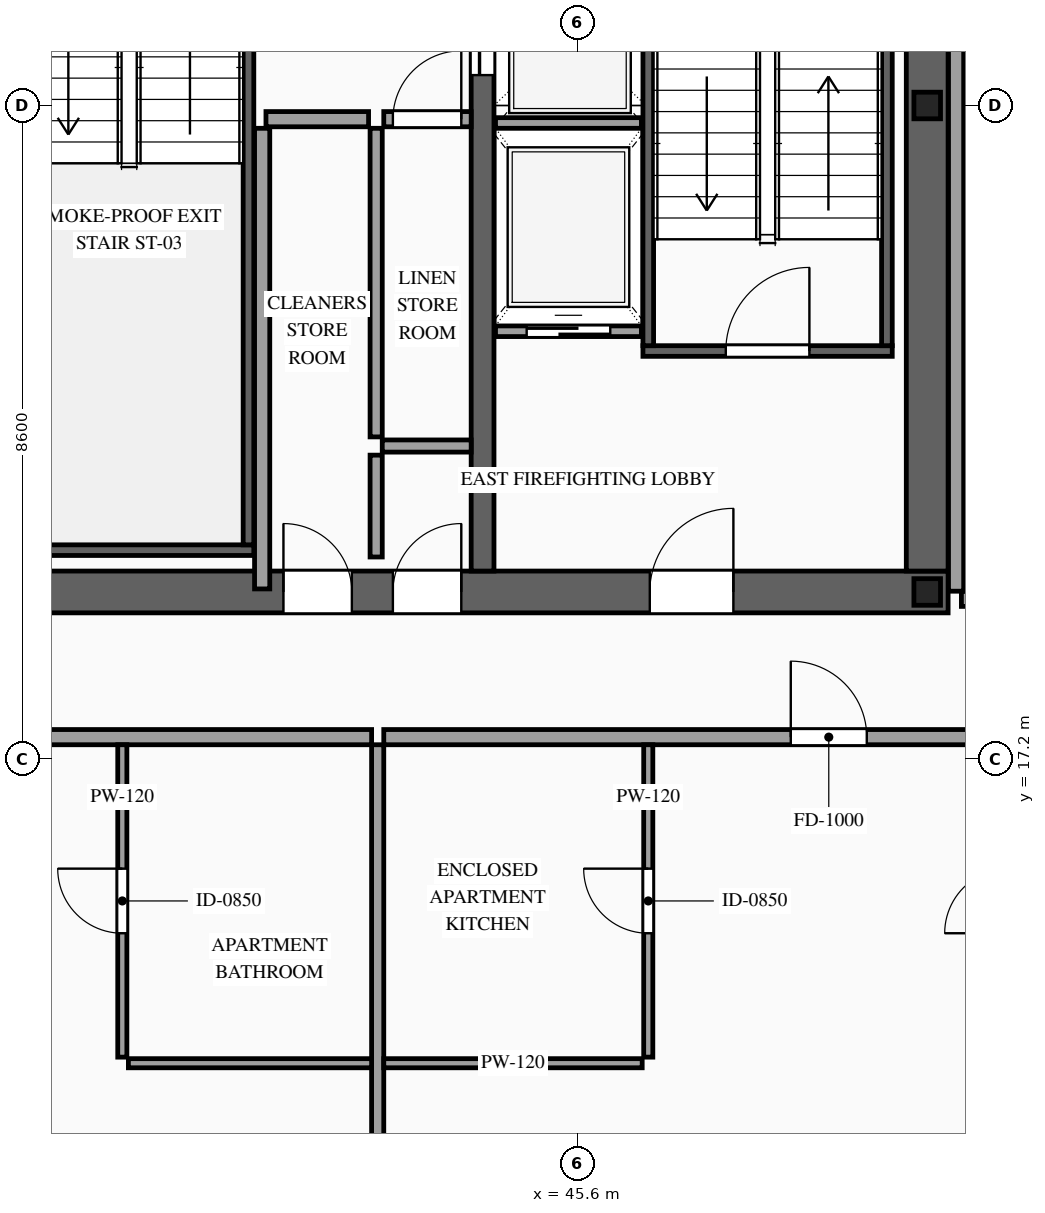
"""IFC4 building model, lengths in metres.
Left out: names, types, materials, properties, quantities, classifications, styles, units other than length and angle.
Written with IfcOpenShell. Run it as: python <this file> out.ifc"""

import sys

from ifc_helpers import new_model, si_unit, direction, frame, frame_2d, origin, origin_2d, place, context, subcontext, project, spatial, rectangle, i_section, extrude, source, transform, mapped, element, fill, save


model = new_model("IFC4")
c1 = context("Model", 3, precision=1e-05, world=origin(), true_north=direction((0.0, 1.0)))
c2 = subcontext(c1, "Body", "Model", "MODEL_VIEW")
j1 = project(units=[si_unit("LENGTHUNIT", "METRE"), si_unit("PLANEANGLEUNIT", "RADIAN")], contexts=[c1])
p1 = place(None, origin())
s1 = spatial("IfcSite", under=j1, at=p1, CompositionType="ELEMENT")
p2 = place(p1, origin())
s2 = spatial("IfcBuilding", under=s1, at=p2, CompositionType="ELEMENT")
p3 = place(p2, frame((0.0, 0.0, 271.6)))
s3 = spatial("IfcBuildingStorey", under=s2, at=p3, CompositionType="ELEMENT", Elevation=271.6)
p4 = place(p3, frame((23.525, 19.4, 0.0), z_axis=(0.0, 0.0, 1.0), x_axis=(1.0, 0.0, 0.0)))
e1 = element("IfcWall", 1, at=p4, inside=s3, PredefinedType="SHEAR", context=c2, shape_type="SweptSolid", body=[
    extrude(rectangle(XDim=26.95, YDim=0.55, at=frame_2d((13.475, 0.0))), origin(), (0.0, 0.0, 1.0), 3.5),
])
p5 = place(p4, frame((1.925, 0.0, 0.0)))
e2 = element("IfcOpeningElement", 2, at=p5, cuts=e1, PredefinedType="OPENING", context=c2, shape_type="SweptSolid", body=[
    extrude(rectangle(XDim=1.1, YDim=2.2, at=frame_2d((0.55, 1.1))), frame((0.0, 0.29, 0.0), z_axis=(0.0, -1.0, 0.0), x_axis=(1.0, 0.0, 0.0)), (0.0, 0.0, 1.0), 0.58),
])
p6 = place(p4, frame((9.825, 0.0, 0.0)))
e3 = element("IfcOpeningElement", 3, at=p6, cuts=e1, PredefinedType="OPENING", context=c2, shape_type="SweptSolid", body=[
    extrude(rectangle(XDim=1.1, YDim=2.2, at=frame_2d((0.55, 1.1))), frame((0.0, 0.29, 0.0), z_axis=(0.0, -1.0, 0.0), x_axis=(1.0, 0.0, 0.0)), (0.0, 0.0, 1.0), 0.58),
])
p7 = place(p4, frame((23.025, 0.0, 0.0)))
e4 = element("IfcOpeningElement", 4, at=p7, cuts=e1, PredefinedType="OPENING", context=c2, shape_type="SweptSolid", body=[
    extrude(rectangle(XDim=1.1, YDim=2.2, at=frame_2d((0.55, 1.1))), frame((0.0, 0.29, 0.0), z_axis=(0.0, -1.0, 0.0), x_axis=(1.0, 0.0, 0.0)), (0.0, 0.0, 1.0), 0.58),
])
p8 = place(p4, frame((19.645, 0.0, 0.0)))
e5 = element("IfcOpeningElement", 5, at=p8, cuts=e1, PredefinedType="OPENING", context=c2, shape_type="SweptSolid", body=[
    extrude(rectangle(XDim=0.9, YDim=2.15, at=frame_2d((0.45, 1.075))), frame((0.0, 0.29, 0.0), z_axis=(0.0, -1.0, 0.0), x_axis=(1.0, 0.0, 0.0)), (0.0, 0.0, 1.0), 0.58),
])
p9 = place(p4, frame((18.205, 0.0, 0.0)))
e6 = element("IfcOpeningElement", 6, at=p9, cuts=e1, PredefinedType="OPENING", context=c2, shape_type="SweptSolid", body=[
    extrude(rectangle(XDim=0.9, YDim=2.15, at=frame_2d((0.45, 1.075))), frame((0.0, 0.29, 0.0), z_axis=(0.0, -1.0, 0.0), x_axis=(1.0, 0.0, 0.0)), (0.0, 0.0, 1.0), 0.58),
])
m1 = source(origin(), c2, "Body", "SweptSolid", [
    extrude(rectangle(XDim=12.25, YDim=0.55, at=frame_2d((6.125, 0.0))), origin(), (0.0, 0.0, 1.0), 3.5),
])
p10 = place(p3, frame((50.2, 19.675, 0.0), z_axis=(0.0, 0.0, 1.0), x_axis=(0.0, 1.0, 0.0)))
e7 = element("IfcWall", 7, at=p10, inside=s3, PredefinedType="SHEAR", context=c2, shape_type="MappedRepresentation", body=[
    mapped(m1, transform((0.0, 0.0, 0.0), scale=1.0)),
])
p11 = place(p3, frame((44.35, 19.675, 0.0), z_axis=(0.0, 0.0, 1.0), x_axis=(0.0, 1.0, 0.0)))
e8 = element("IfcWall", 8, at=p11, inside=s3, PredefinedType="SOLIDWALL", context=c2, shape_type="SweptSolid", body=[
    extrude(rectangle(XDim=12.25, YDim=0.3, at=frame_2d((6.125, 0.0))), origin(), (0.0, 0.0, 1.0), 3.5),
])
p12 = place(p11, frame((6.525, 0.0, 0.0)))
e9 = element("IfcOpeningElement", 9, at=p12, cuts=e8, PredefinedType="OPENING", context=c2, shape_type="SweptSolid", body=[
    extrude(rectangle(XDim=1.1, YDim=2.2, at=frame_2d((0.55, 1.1))), frame((0.0, 0.165, 0.0), z_axis=(0.0, -1.0, 0.0), x_axis=(1.0, 0.0, 0.0)), (0.0, 0.0, 1.0), 0.33),
])
p13 = place(p11, frame((8.625, 0.0, 0.0)))
e10 = element("IfcOpeningElement", 10, at=p13, cuts=e8, PredefinedType="OPENING", context=c2, shape_type="SweptSolid", body=[
    extrude(rectangle(XDim=1.1, YDim=2.2, at=frame_2d((0.55, 1.1))), frame((0.0, 0.165, 0.0), z_axis=(0.0, -1.0, 0.0), x_axis=(1.0, 0.0, 0.0)), (0.0, 0.0, 1.0), 0.33),
])
p14 = place(p11, frame((10.725, 0.0, 0.0)))
e11 = element("IfcOpeningElement", 11, at=p14, cuts=e8, PredefinedType="OPENING", context=c2, shape_type="SweptSolid", body=[
    extrude(rectangle(XDim=1.1, YDim=2.2, at=frame_2d((0.55, 1.1))), frame((0.0, 0.165, 0.0), z_axis=(0.0, -1.0, 0.0), x_axis=(1.0, 0.0, 0.0)), (0.0, 0.0, 1.0), 0.33),
])
m2 = source(origin(), c2, "Body", "SweptSolid", [
    extrude(i_section(OverallWidth=0.35, OverallDepth=0.35, WebThickness=0.012, FlangeThickness=0.019, at=origin_2d()), origin(), (0.0, 0.0, 1.0), 3.5),
])
for number, where, z_axis, x_axis in (
    (12, (50.2, 19.4, 0.0), (0.0, 0.0, 1.0), (1.0, 0.0, 0.0)),
    (13, (50.2, 25.8, 0.0), (0.0, 0.0, 1.0), (1.0, 0.0, 0.0)),
):
    element("IfcColumn", number, at=place(p3, frame(where, z_axis=z_axis, x_axis=x_axis)), inside=s3, PredefinedType="COLUMN", context=c2, shape_type="MappedRepresentation", body=[
        mapped(m2, transform((0.0, 0.0, 0.0), scale=1.0)),
    ])
p15 = place(p3, frame((44.52, 22.83, 0.0), z_axis=(0.0, 0.0, 1.0), x_axis=(1.0, 0.0, 0.0)))
e14 = element("IfcWall", 14, at=p15, inside=s3, PredefinedType="SOLIDWALL", context=c2, shape_type="SweptSolid", body=[
    extrude(rectangle(XDim=1.92, YDim=0.14, at=frame_2d((0.96, 0.0))), origin(), (0.0, 0.0, 1.0), 3.28),
])
p16 = place(p15, frame((0.41, 0.0, 0.0)))
e15 = element("IfcOpeningElement", 15, at=p16, cuts=e14, PredefinedType="OPENING", context=c2, shape_type="SweptSolid", body=[
    extrude(rectangle(XDim=1.1, YDim=2.2, at=frame_2d((0.55, 1.1))), frame((0.0, 0.085, 0.0), z_axis=(0.0, -1.0, 0.0), x_axis=(1.0, 0.0, 0.0)), (0.0, 0.0, 1.0), 0.17),
])
m3 = source(origin(), c2, "Body", "SweptSolid", [
    extrude(rectangle(XDim=1.92, YDim=0.14, at=frame_2d((0.96, 0.0))), origin(), (0.0, 0.0, 1.0), 3.28),
])
p17 = place(p3, frame((44.52, 25.57, 0.0), z_axis=(0.0, 0.0, 1.0), x_axis=(1.0, 0.0, 0.0)))
e16 = element("IfcWall", 16, at=p17, inside=s3, PredefinedType="SOLIDWALL", context=c2, shape_type="MappedRepresentation", body=[
    mapped(m3, transform((0.0, 0.0, 0.0), scale=1.0)),
])
p18 = place(p3, frame((46.46, 22.57, 0.0), z_axis=(0.0, 0.0, 1.0), x_axis=(1.0, 0.0, 0.0)))
e17 = element("IfcWall", 17, at=p18, inside=s3, PredefinedType="SOLIDWALL", context=c2, shape_type="SweptSolid", body=[
    extrude(rectangle(XDim=3.28, YDim=0.14, at=frame_2d((1.64, 0.0))), origin(), (0.0, 0.0, 1.0), 3.28),
])
p19 = place(p18, frame((1.09, 0.0, 0.0)))
e18 = element("IfcOpeningElement", 18, at=p19, cuts=e17, PredefinedType="OPENING", context=c2, shape_type="SweptSolid", body=[
    extrude(rectangle(XDim=1.1, YDim=2.2, at=frame_2d((0.55, 1.1))), frame((0.0, 0.085, 0.0), z_axis=(0.0, -1.0, 0.0), x_axis=(1.0, 0.0, 0.0)), (0.0, 0.0, 1.0), 0.17),
])
m4 = source(origin(), c2, "Body", "SweptSolid", [
    extrude(rectangle(XDim=8.94, YDim=0.14, at=frame_2d((4.47, 0.0))), origin(), (0.0, 0.0, 1.0), 3.28),
])
for number, where, z_axis, x_axis in (
    (19, (46.53, 22.64, 0.0), (0.0, 0.0, 1.0), (0.0, 1.0, 0.0)),
    (20, (49.67, 22.64, 0.0), (0.0, 0.0, 1.0), (0.0, 1.0, 0.0)),
):
    element("IfcWall", number, at=place(p3, frame(where, z_axis=z_axis, x_axis=x_axis)), inside=s3, PredefinedType="SOLIDWALL", context=c2, shape_type="MappedRepresentation", body=[
        mapped(m4, transform((0.0, 0.0, 0.0), scale=1.0)),
    ])
m5 = source(origin(), c2, "Body", "SweptSolid", [
    extrude(rectangle(XDim=3.14, YDim=0.14, at=frame_2d((1.57, 0.0))), origin(), (0.0, 0.0, 1.0), 3.28),
])
p20 = place(p3, frame((38.2, 19.95, 0.0), z_axis=(0.0, 0.0, 1.0), x_axis=(1.0, 0.0, 0.0)))
e21 = element("IfcWall", 21, at=p20, inside=s3, PredefinedType="SOLIDWALL", context=c2, shape_type="MappedRepresentation", body=[
    mapped(m5, transform((0.0, 0.0, 0.0), scale=1.0)),
])
m6 = source(origin(), c2, "Body", "SweptSolid", [
    extrude(rectangle(XDim=8.94, YDim=0.14, at=frame_2d((4.47, 0.0))), origin(), (0.0, 0.0, 1.0), 3.28),
])
p21 = place(p3, frame((41.27, 20.02, 0.0), z_axis=(0.0, 0.0, 1.0), x_axis=(0.0, 1.0, 0.0)))
e22 = element("IfcWall", 22, at=p21, inside=s3, PredefinedType="SOLIDWALL", context=c2, shape_type="MappedRepresentation", body=[
    mapped(m6, transform((0.0, 0.0, 0.0), scale=1.0)),
])
m7 = source(origin(), c2, "Body", "SweptSolid", [
    extrude(rectangle(XDim=1.34, YDim=0.16, at=frame_2d((0.67, 0.0))), origin(), (0.0, 0.0, 1.0), 3.28),
])
p22 = place(p3, frame((42.95, 19.86, 0.0), z_axis=(0.0, 0.0, 1.0), x_axis=(0.0, 1.0, 0.0)))
e23 = element("IfcWall", 23, at=p22, inside=s3, PredefinedType="PARTITIONING", context=c2, shape_type="MappedRepresentation", body=[
    mapped(m7, transform((0.0, 0.0, 0.0), scale=1.0)),
])
m8 = source(origin(), c2, "Body", "SweptSolid", [
    extrude(rectangle(XDim=1.17, YDim=0.16, at=frame_2d((0.585, 0.0))), origin(), (0.0, 0.0, 1.0), 3.28),
])
p23 = place(p3, frame((43.03, 21.32, 0.0), z_axis=(0.0, 0.0, 1.0), x_axis=(1.0, 0.0, 0.0)))
e24 = element("IfcWall", 24, at=p23, inside=s3, PredefinedType="PARTITIONING", context=c2, shape_type="MappedRepresentation", body=[
    mapped(m8, transform((0.0, 0.0, 0.0), scale=1.0)),
])
m9 = source(origin(), c2, "Body", "SweptSolid", [
    extrude(rectangle(XDim=6.06, YDim=0.2, at=frame_2d((3.03, 0.0))), origin(), (0.0, 0.0, 1.0), 3.28),
])
p24 = place(p3, frame((41.45, 19.44, 0.0), z_axis=(0.0, 0.0, 1.0), x_axis=(0.0, 1.0, 0.0)))
e25 = element("IfcWall", 25, at=p24, inside=s3, PredefinedType="PARTITIONING", context=c2, shape_type="MappedRepresentation", body=[
    mapped(m9, transform((0.0, 0.0, 0.0), scale=1.0)),
])
m10 = source(origin(), c2, "Body", "SweptSolid", [
    extrude(rectangle(XDim=1.35, YDim=0.2, at=frame_2d((0.675, 0.0))), origin(), (0.0, 0.0, 1.0), 3.28),
])
p25 = place(p3, frame((41.5, 25.62, 0.0), z_axis=(0.0, 0.0, 1.0), x_axis=(1.0, 0.0, 0.0)))
e26 = element("IfcWall", 26, at=p25, inside=s3, PredefinedType="PARTITIONING", context=c2, shape_type="MappedRepresentation", body=[
    mapped(m10, transform((0.0, 0.0, 0.0), scale=1.0)),
])
m11 = source(origin(), c2, "Body", "SweptSolid", [
    extrude(rectangle(XDim=4.06, YDim=0.16, at=frame_2d((2.03, 0.0))), origin(), (0.0, 0.0, 1.0), 3.28),
])
p26 = place(p3, frame((42.95, 21.44, 0.0), z_axis=(0.0, 0.0, 1.0), x_axis=(0.0, 1.0, 0.0)))
e27 = element("IfcWall", 27, at=p26, inside=s3, PredefinedType="PARTITIONING", context=c2, shape_type="MappedRepresentation", body=[
    mapped(m11, transform((0.0, 0.0, 0.0), scale=1.0)),
])
p27 = place(p3, frame((43.05, 25.62, 0.0), z_axis=(0.0, 0.0, 1.0), x_axis=(1.0, 0.0, 0.0)))
e28 = element("IfcWall", 28, at=p27, inside=s3, PredefinedType="PARTITIONING", context=c2, shape_type="SweptSolid", body=[
    extrude(rectangle(XDim=1.15, YDim=0.2, at=frame_2d((0.575, 0.0))), origin(), (0.0, 0.0, 1.0), 3.28),
])
p28 = place(p27, frame((0.12, 0.0, 0.0)))
e29 = element("IfcOpeningElement", 29, at=p28, cuts=e28, PredefinedType="OPENING", context=c2, shape_type="SweptSolid", body=[
    extrude(rectangle(XDim=0.9, YDim=2.15, at=frame_2d((0.45, 1.075))), frame((0.0, 0.115, 0.0), z_axis=(0.0, -1.0, 0.0), x_axis=(1.0, 0.0, 0.0)), (0.0, 0.0, 1.0), 0.23),
])
p29 = place(p3, frame((31.461, 17.49, 0.0), z_axis=(0.0, 0.0, 1.0), x_axis=(1.0, 0.0, 0.0)))
e30 = element("IfcWall", 30, at=p29, inside=s3, PredefinedType="PARTITIONING", context=c2, shape_type="SweptSolid", body=[
    extrude(rectangle(XDim=11.429, YDim=0.2, at=frame_2d((5.714, 0.0))), origin(), (0.0, 0.0, 1.0), 3.28),
])
p30 = place(p29, frame((5.314, 0.0, 0.0)))
e31 = element("IfcOpeningElement", 31, at=p30, cuts=e30, PredefinedType="OPENING", context=c2, shape_type="SweptSolid", body=[
    extrude(rectangle(XDim=1.0, YDim=2.2, at=frame_2d((0.5, 1.1))), frame((0.0, 0.115, 0.0), z_axis=(0.0, -1.0, 0.0), x_axis=(1.0, 0.0, 0.0)), (0.0, 0.0, 1.0), 0.23),
])
m12 = source(origin(), c2, "Body", "SweptSolid", [
    extrude(rectangle(XDim=12.04, YDim=0.16, at=frame_2d((6.02, 0.0))), origin(), (0.0, 0.0, 1.0), 3.28),
])
p31 = place(p3, frame((42.97, 5.35, 0.0), z_axis=(0.0, 0.0, 1.0), x_axis=(0.0, 1.0, 0.0)))
e32 = element("IfcWall", 32, at=p31, inside=s3, PredefinedType="PARTITIONING", context=c2, shape_type="MappedRepresentation", body=[
    mapped(m12, transform((0.0, 0.0, 0.0), scale=1.0)),
])
m13 = source(origin(), c2, "Body", "SweptSolid", [
    extrude(rectangle(XDim=3.2, YDim=0.12, at=frame_2d((1.6, 0.0))), origin(), (0.0, 0.0, 1.0), 3.28),
])
p32 = place(p3, frame((39.69, 13.2, 0.0), z_axis=(0.0, 0.0, 1.0), x_axis=(1.0, 0.0, 0.0)))
e33 = element("IfcWall", 33, at=p32, inside=s3, PredefinedType="PARTITIONING", context=c2, shape_type="MappedRepresentation", body=[
    mapped(m13, transform((0.0, 0.0, 0.0), scale=1.0)),
])
p33 = place(p3, frame((39.61, 13.28, 0.0), z_axis=(0.0, 0.0, 1.0), x_axis=(0.0, 1.0, 0.0)))
e34 = element("IfcWall", 34, at=p33, inside=s3, PredefinedType="PARTITIONING", context=c2, shape_type="SweptSolid", body=[
    extrude(rectangle(XDim=4.11, YDim=0.12, at=frame_2d((2.055, 0.0))), origin(), (0.0, 0.0, 1.0), 3.28),
])
p34 = place(p33, frame((1.63, 0.0, 0.0)))
e35 = element("IfcOpeningElement", 35, at=p34, cuts=e34, PredefinedType="OPENING", context=c2, shape_type="SweptSolid", body=[
    extrude(rectangle(XDim=0.85, YDim=2.1, at=frame_2d((0.425, 1.05))), frame((0.0, 0.075, 0.0), z_axis=(0.0, -1.0, 0.0), x_axis=(1.0, 0.0, 0.0)), (0.0, 0.0, 1.0), 0.15),
])
p35 = place(p3, frame((43.05, 17.49, 0.0), z_axis=(0.0, 0.0, 1.0), x_axis=(1.0, 0.0, 0.0)))
e36 = element("IfcWall", 36, at=p35, inside=s3, PredefinedType="PARTITIONING", context=c2, shape_type="SweptSolid", body=[
    extrude(rectangle(XDim=11.51, YDim=0.2, at=frame_2d((5.755, 0.0))), origin(), (0.0, 0.0, 1.0), 3.28),
])
p36 = place(p35, frame((5.355, 0.0, 0.0)))
e37 = element("IfcOpeningElement", 37, at=p36, cuts=e36, PredefinedType="OPENING", context=c2, shape_type="SweptSolid", body=[
    extrude(rectangle(XDim=1.0, YDim=2.2, at=frame_2d((0.5, 1.1))), frame((0.0, 0.115, 0.0), z_axis=(0.0, -1.0, 0.0), x_axis=(1.0, 0.0, 0.0)), (0.0, 0.0, 1.0), 0.23),
])
m14 = source(origin(), c2, "Body", "SweptSolid", [
    extrude(rectangle(XDim=3.4, YDim=0.12, at=frame_2d((1.7, 0.0))), origin(), (0.0, 0.0, 1.0), 3.28),
])
p37 = place(p3, frame((43.05, 13.2, 0.0), z_axis=(0.0, 0.0, 1.0), x_axis=(1.0, 0.0, 0.0)))
e38 = element("IfcWall", 38, at=p37, inside=s3, PredefinedType="PARTITIONING", context=c2, shape_type="MappedRepresentation", body=[
    mapped(m14, transform((0.0, 0.0, 0.0), scale=1.0)),
])
p38 = place(p3, frame((46.53, 13.28, 0.0), z_axis=(0.0, 0.0, 1.0), x_axis=(0.0, 1.0, 0.0)))
e39 = element("IfcWall", 39, at=p38, inside=s3, PredefinedType="PARTITIONING", context=c2, shape_type="SweptSolid", body=[
    extrude(rectangle(XDim=4.11, YDim=0.12, at=frame_2d((2.055, 0.0))), origin(), (0.0, 0.0, 1.0), 3.28),
])
p39 = place(p38, frame((1.63, 0.0, 0.0)))
e40 = element("IfcOpeningElement", 40, at=p39, cuts=e39, PredefinedType="OPENING", context=c2, shape_type="SweptSolid", body=[
    extrude(rectangle(XDim=0.85, YDim=2.1, at=frame_2d((0.425, 1.05))), frame((0.0, 0.075, 0.0), z_axis=(0.0, -1.0, 0.0), x_axis=(1.0, 0.0, 0.0)), (0.0, 0.0, 1.0), 0.15),
])
p40 = place(p3, frame((50.65, 19.31, 0.0), z_axis=(0.0, 0.0, 1.0), x_axis=(1.0, 0.0, 0.0)))
e41 = element("IfcWall", 41, at=p40, inside=s3, PredefinedType="PARTITIONING", context=c2, shape_type="SweptSolid", body=[
    extrude(rectangle(XDim=6.8, YDim=0.2, at=frame_2d((3.4, 0.0))), origin(), (0.0, 0.0, 1.0), 2.825),
])
p41 = place(p40, frame((0.4, 0.0, 0.0)))
e42 = element("IfcOpeningElement", 42, at=p41, cuts=e41, PredefinedType="OPENING", context=c2, shape_type="SweptSolid", body=[
    extrude(rectangle(XDim=1.0, YDim=2.2, at=frame_2d((0.5, 1.1))), frame((0.0, 0.115, 0.0), z_axis=(0.0, -1.0, 0.0), x_axis=(1.0, 0.0, 0.0)), (0.0, 0.0, 1.0), 0.23),
])
m15 = source(origin(), c2, "Body", "SweptSolid", [
    extrude(rectangle(XDim=12.78, YDim=0.2, at=frame_2d((6.39, 0.0))), origin(), (0.0, 0.0, 1.0), 3.28),
])
p42 = place(p3, frame((50.58, 19.41, 0.0), z_axis=(0.0, 0.0, 1.0), x_axis=(0.0, 1.0, 0.0)))
e43 = element("IfcWall", 43, at=p42, inside=s3, PredefinedType="PARTITIONING", context=c2, shape_type="MappedRepresentation", body=[
    mapped(m15, transform((0.0, 0.0, 0.0), scale=1.0)),
])
m16 = source(origin(), c2, "Body", "SweptSolid", [
    extrude(rectangle(XDim=1.1, YDim=2.2, at=frame_2d((0.55, 1.1))), frame((0.0, 0.025, 0.0), z_axis=(0.0, -1.0, 0.0), x_axis=(1.0, 0.0, 0.0)), (0.0, 0.0, 1.0), 0.05),
])
p43 = place(p16, origin())
e44 = element("IfcDoor", 44, at=p43, inside=s3, OperationType="SLIDING_TO_RIGHT", PredefinedType="DOOR", context=c2, shape_type="MappedRepresentation", body=[
    mapped(m16, transform((0.0, 0.0, 0.0), scale=1.0)),
])
fill(e15, e44)
p44 = place(p12, origin())
e45 = element("IfcDoor", 45, at=p44, inside=s3, OperationType="SLIDING_TO_LEFT", PredefinedType="DOOR", context=c2, shape_type="MappedRepresentation", body=[
    mapped(m16, transform((0.0, 0.0, 0.0), scale=1.0)),
])
fill(e9, e45)
m17 = source(origin(), c2, "Body", "SweptSolid", [
    extrude(rectangle(XDim=1.1, YDim=2.2, at=frame_2d((0.55, 1.1))), frame((0.0, 0.025, 0.0), z_axis=(0.0, -1.0, 0.0), x_axis=(1.0, 0.0, 0.0)), (0.0, 0.0, 1.0), 0.05),
])
p45 = place(p19, origin())
e46 = element("IfcDoor", 46, at=p45, inside=s3, OperationType="SINGLE_SWING_RIGHT", PredefinedType="DOOR", context=c2, shape_type="MappedRepresentation", body=[
    mapped(m17, transform((0.0, 0.0, 0.0), scale=1.0)),
])
fill(e18, e46)
p46 = place(p7, origin())
e47 = element("IfcDoor", 47, at=p46, inside=s3, OperationType="SINGLE_SWING_RIGHT", PredefinedType="DOOR", context=c2, shape_type="MappedRepresentation", body=[
    mapped(m17, transform((0.0, 0.0, 0.0), scale=1.0)),
])
fill(e4, e47)
m18 = source(origin(), c2, "Body", "SweptSolid", [
    extrude(rectangle(XDim=0.9, YDim=2.15, at=frame_2d((0.45, 1.075))), frame((0.0, 0.025, 0.0), z_axis=(0.0, -1.0, 0.0), x_axis=(1.0, 0.0, 0.0)), (0.0, 0.0, 1.0), 0.05),
])
p47 = place(p8, origin())
e48 = element("IfcDoor", 48, at=p47, inside=s3, OperationType="SINGLE_SWING_RIGHT", PredefinedType="DOOR", context=c2, shape_type="MappedRepresentation", body=[
    mapped(m18, transform((0.0, 0.0, 0.0), scale=1.0)),
])
fill(e5, e48)
p48 = place(p9, origin())
e49 = element("IfcDoor", 49, at=p48, inside=s3, OperationType="SINGLE_SWING_LEFT", PredefinedType="DOOR", context=c2, shape_type="MappedRepresentation", body=[
    mapped(m18, transform((0.0, 0.0, 0.0), scale=1.0)),
])
fill(e6, e49)
p49 = place(p28, origin())
e50 = element("IfcDoor", 50, at=p49, inside=s3, OperationType="SINGLE_SWING_RIGHT", PredefinedType="DOOR", context=c2, shape_type="MappedRepresentation", body=[
    mapped(m18, transform((0.0, 0.0, 0.0), scale=1.0)),
])
fill(e29, e50)
m19 = source(origin(), c2, "Body", "SweptSolid", [
    extrude(rectangle(XDim=0.85, YDim=2.1, at=frame_2d((0.425, 1.05))), frame((0.0, 0.025, 0.0), z_axis=(0.0, -1.0, 0.0), x_axis=(1.0, 0.0, 0.0)), (0.0, 0.0, 1.0), 0.05),
])
p50 = place(p34, origin())
e51 = element("IfcDoor", 51, at=p50, inside=s3, OperationType="SINGLE_SWING_RIGHT", PredefinedType="DOOR", context=c2, shape_type="MappedRepresentation", body=[
    mapped(m19, transform((0.0, 0.0, 0.0), scale=1.0)),
])
fill(e35, e51)
m20 = source(origin(), c2, "Body", "SweptSolid", [
    extrude(rectangle(XDim=1.0, YDim=2.2, at=frame_2d((0.5, 1.1))), frame((0.0, 0.025, 0.0), z_axis=(0.0, -1.0, 0.0), x_axis=(1.0, 0.0, 0.0)), (0.0, 0.0, 1.0), 0.05),
])
p51 = place(p36, origin())
e52 = element("IfcDoor", 52, at=p51, inside=s3, OperationType="SINGLE_SWING_LEFT", PredefinedType="DOOR", context=c2, shape_type="MappedRepresentation", body=[
    mapped(m20, transform((0.0, 0.0, 0.0), scale=1.0)),
])
fill(e37, e52)
p52 = place(p39, origin())
e53 = element("IfcDoor", 53, at=p52, inside=s3, OperationType="SINGLE_SWING_RIGHT", PredefinedType="DOOR", context=c2, shape_type="MappedRepresentation", body=[
    mapped(m19, transform((0.0, 0.0, 0.0), scale=1.0)),
])
fill(e40, e53)
save(model, sys.argv[1])
